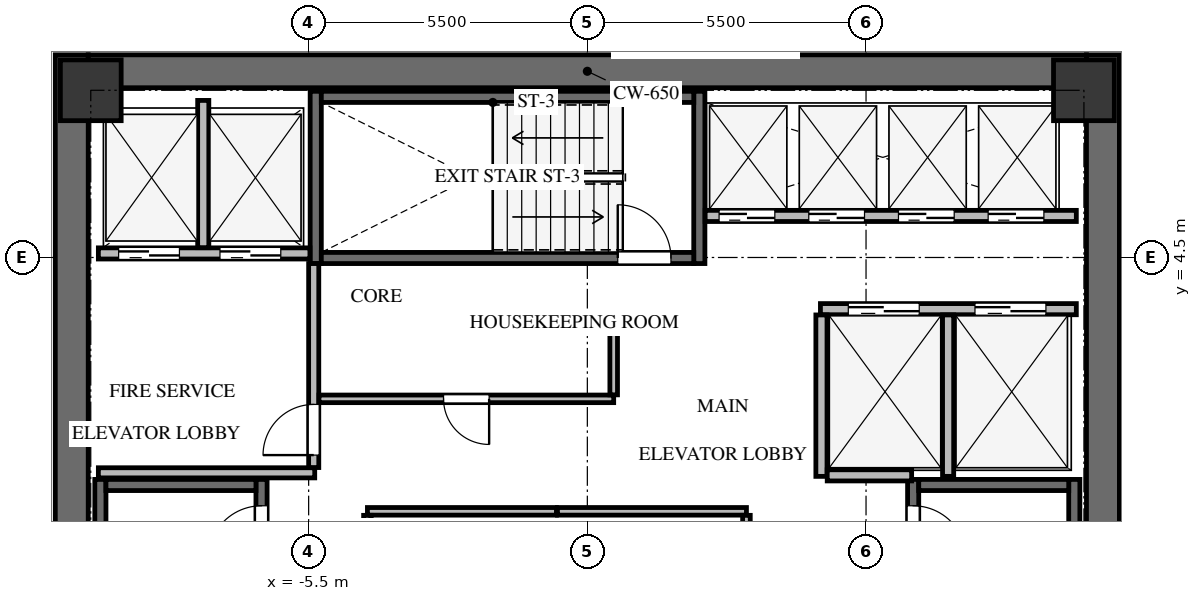
"""IFC4 building model, lengths in metres.
Left out: names, types, materials, properties, quantities, classifications, styles, units other than length and angle.
Written with IfcOpenShell. Run it as: python <this file> out.ifc"""

import sys

from ifc_helpers import new_model, si_unit, direction, frame, frame_2d, origin, origin_2d, place, context, subcontext, project, spatial, rectangle, extrude, source, transform, mapped, element, fill, save


model = new_model("IFC4")
c1 = context("Model", 3, precision=1e-05, world=origin(), true_north=direction((0.0, 1.0)))
c2 = subcontext(c1, "Body", "Model", "MODEL_VIEW")
j1 = project(units=[si_unit("LENGTHUNIT", "METRE"), si_unit("PLANEANGLEUNIT", "RADIAN")], contexts=[c1])
p1 = place(None, origin())
s1 = spatial("IfcSite", under=j1, at=p1, CompositionType="ELEMENT")
p2 = place(p1, origin())
s2 = spatial("IfcBuilding", under=s1, at=p2, CompositionType="ELEMENT")
p3 = place(p2, frame((0.0, 0.0, 183.7)))
s3 = spatial("IfcBuildingStorey", under=s2, at=p3, CompositionType="ELEMENT", Elevation=183.7)
for number, where, z_axis, x_axis in (
    (1, (-10.175, -8.5, 0.0), (0.0, 0.0, 1.0), (0.0, 1.0, 0.0)),
    (2, (10.175, -8.5, 0.0), (0.0, 0.0, 1.0), (0.0, 1.0, 0.0)),
):
    element("IfcWall", number, at=place(p3, frame(where, z_axis=z_axis, x_axis=x_axis)), inside=s3, PredefinedType="SHEAR", context=c2, shape_type="SweptSolid", body=[
        extrude(rectangle(XDim=17.0, YDim=0.65, at=frame_2d((8.5, 0.0))), origin(), (0.0, 0.0, 1.0), 3.3),
    ])
p4 = place(p3, frame((-9.85, 8.175, 0.0), z_axis=(0.0, 0.0, 1.0), x_axis=(1.0, 0.0, 0.0)))
e3 = element("IfcWall", 3, at=p4, inside=s3, PredefinedType="SHEAR", context=c2, shape_type="SweptSolid", body=[
    extrude(rectangle(XDim=19.7, YDim=0.65, at=frame_2d((9.85, 0.0))), origin(), (0.0, 0.0, 1.0), 3.3),
])
p5 = place(p3, frame((-6.43, -7.77, -0.24), z_axis=(0.0, 0.0, 1.0), x_axis=(0.0, 1.0, 0.0)))
e4 = element("IfcWall", 4, at=p5, inside=s3, PredefinedType="SHEAR", context=c2, shape_type="SweptSolid", body=[
    extrude(rectangle(XDim=7.89, YDim=0.22, at=frame_2d((3.945, 0.0))), origin(), (0.0, 0.0, 1.0), 3.3),
])
p6 = place(p5, frame((6.32, 0.0, 0.0)))
e5 = element("IfcOpeningElement", 5, at=p6, cuts=e4, PredefinedType="OPENING", context=c2, shape_type="SweptSolid", body=[
    extrude(rectangle(XDim=1.05, YDim=2.15, at=frame_2d((0.525, 1.075))), frame((0.0, 0.12, 0.0), z_axis=(0.0, -1.0, 0.0), x_axis=(1.0, 0.0, 0.0)), (0.0, 0.0, 1.0), 0.24),
])
p7 = place(p3, frame((-9.61, 0.12, -0.24), z_axis=(0.0, 0.0, 1.0), x_axis=(0.0, -1.0, 0.0)))
e6 = element("IfcWall", 6, at=p7, inside=s3, PredefinedType="SHEAR", context=c2, shape_type="SweptSolid", body=[
    extrude(rectangle(XDim=7.89, YDim=0.22, at=frame_2d((3.945, 0.0))), origin(), (0.0, 0.0, 1.0), 3.3),
])
p8 = place(p3, frame((-6.54, 0.01, -0.24), z_axis=(0.0, 0.0, 1.0), x_axis=(-1.0, 0.0, 0.0)))
e7 = element("IfcWall", 7, at=p8, inside=s3, PredefinedType="SHEAR", context=c2, shape_type="SweptSolid", body=[
    extrude(rectangle(XDim=2.96, YDim=0.22, at=frame_2d((1.48, 0.0))), origin(), (0.0, 0.0, 1.0), 3.3),
])
p9 = place(p3, frame((9.61, -7.77, -0.24), z_axis=(0.0, 0.0, 1.0), x_axis=(0.0, 1.0, 0.0)))
e8 = element("IfcWall", 8, at=p9, inside=s3, PredefinedType="SHEAR", context=c2, shape_type="SweptSolid", body=[
    extrude(rectangle(XDim=7.89, YDim=0.22, at=frame_2d((3.945, 0.0))), origin(), (0.0, 0.0, 1.0), 3.3),
])
p10 = place(p3, frame((6.43, 0.12, -0.24), z_axis=(0.0, 0.0, 1.0), x_axis=(0.0, -1.0, 0.0)))
e9 = element("IfcWall", 9, at=p10, inside=s3, PredefinedType="SHEAR", context=c2, shape_type="SweptSolid", body=[
    extrude(rectangle(XDim=7.89, YDim=0.22, at=frame_2d((3.945, 0.0))), origin(), (0.0, 0.0, 1.0), 3.3),
])
p11 = place(p10, frame((0.52, 0.0, 0.0)))
e10 = element("IfcOpeningElement", 10, at=p11, cuts=e9, PredefinedType="OPENING", context=c2, shape_type="SweptSolid", body=[
    extrude(rectangle(XDim=1.05, YDim=2.15, at=frame_2d((0.525, 1.075))), frame((0.0, 0.12, 0.0), z_axis=(0.0, -1.0, 0.0), x_axis=(1.0, 0.0, 0.0)), (0.0, 0.0, 1.0), 0.24),
])
p12 = place(p3, frame((9.5, 0.01, -0.24), z_axis=(0.0, 0.0, 1.0), x_axis=(-1.0, 0.0, 0.0)))
e11 = element("IfcWall", 11, at=p12, inside=s3, PredefinedType="SHEAR", context=c2, shape_type="SweptSolid", body=[
    extrude(rectangle(XDim=2.96, YDim=0.22, at=frame_2d((1.48, 0.0))), origin(), (0.0, 0.0, 1.0), 3.3),
])
for number, where, z_axis, x_axis in (
    (12, (2.21, 4.38, -0.24), (0.0, 0.0, 1.0), (0.0, 1.0, 0.0)),
    (13, (-5.36, 7.78, -0.24), (0.0, 0.0, 1.0), (0.0, -1.0, 0.0)),
):
    element("IfcWall", number, at=place(p3, frame(where, z_axis=z_axis, x_axis=x_axis)), inside=s3, PredefinedType="SHEAR", context=c2, shape_type="SweptSolid", body=[
        extrude(rectangle(XDim=3.4, YDim=0.22, at=frame_2d((1.7, 0.0))), origin(), (0.0, 0.0, 1.0), 3.3),
    ])
p13 = place(p3, frame((-5.25, 4.49, -0.24), z_axis=(0.0, 0.0, 1.0), x_axis=(1.0, 0.0, 0.0)))
e14 = element("IfcWall", 14, at=p13, inside=s3, PredefinedType="SHEAR", context=c2, shape_type="SweptSolid", body=[
    extrude(rectangle(XDim=7.35, YDim=0.22, at=frame_2d((3.675, 0.0))), origin(), (0.0, 0.0, 1.0), 3.3),
])
p14 = place(p13, frame((5.85, 0.0, 0.0)))
e15 = element("IfcOpeningElement", 15, at=p14, cuts=e14, PredefinedType="OPENING", context=c2, shape_type="SweptSolid", body=[
    extrude(rectangle(XDim=1.05, YDim=2.15, at=frame_2d((0.525, 1.075))), frame((0.0, 0.12, 0.0), z_axis=(0.0, -1.0, 0.0), x_axis=(1.0, 0.0, 0.0)), (0.0, 0.0, 1.0), 0.24),
])
p15 = place(p3, frame((2.1, 7.67, -0.24), z_axis=(0.0, 0.0, 1.0), x_axis=(-1.0, 0.0, 0.0)))
e16 = element("IfcWall", 16, at=p15, inside=s3, PredefinedType="SHEAR", context=c2, shape_type="SweptSolid", body=[
    extrude(rectangle(XDim=7.35, YDim=0.22, at=frame_2d((3.675, 0.0))), origin(), (0.0, 0.0, 1.0), 3.3),
])
m1 = source(origin(), c2, "Body", "SweptSolid", [
    extrude(rectangle(XDim=1.2, YDim=1.2, at=origin_2d()), origin(), (0.0, 0.0, 1.0), 3.3),
])
for number, where, z_axis, x_axis in (
    (17, (9.8, 7.8, -0.24), (0.0, 0.0, 1.0), (1.0, 0.0, 0.0)),
    (18, (-9.8, 7.8, -0.24), (0.0, 0.0, 1.0), (1.0, 0.0, 0.0)),
):
    element("IfcColumn", number, at=place(p3, frame(where, z_axis=z_axis, x_axis=x_axis)), inside=s3, PredefinedType="COLUMN", context=c2, shape_type="MappedRepresentation", body=[
        mapped(m1, transform((0.0, 0.0, 0.0), x_axis=(1.0, 0.0, 0.0), y_axis=(0.0, 1.0, 0.0), z_axis=(0.0, 0.0, 1.0), scale=1.0)),
    ])
p16 = place(p3, frame((-9.65, 4.58, 0.0), z_axis=(0.0, 0.0, 1.0), x_axis=(1.0, 0.0, 0.0)))
e19 = element("IfcWall", 19, at=p16, inside=s3, PredefinedType="SOLIDWALL", context=c2, shape_type="SweptSolid", body=[
    extrude(rectangle(XDim=4.175, YDim=0.22, at=frame_2d((2.087, 0.0))), origin(), (0.0, 0.0, 1.0), 3.045),
])
p17 = place(p16, frame((0.4, 0.0, 0.0)))
e20 = element("IfcOpeningElement", 20, at=p17, cuts=e19, PredefinedType="OPENING", context=c2, shape_type="SweptSolid", body=[
    extrude(rectangle(XDim=1.2, YDim=2.15, at=frame_2d((0.6, 1.075))), frame((0.0, 0.12, 0.0), z_axis=(0.0, -1.0, 0.0), x_axis=(1.0, 0.0, 0.0)), (0.0, 0.0, 1.0), 0.24),
])
p18 = place(p16, frame((2.4, 0.0, 0.0)))
e21 = element("IfcOpeningElement", 21, at=p18, cuts=e19, PredefinedType="OPENING", context=c2, shape_type="SweptSolid", body=[
    extrude(rectangle(XDim=1.2, YDim=2.15, at=frame_2d((0.6, 1.075))), frame((0.0, 0.12, 0.0), z_axis=(0.0, -1.0, 0.0), x_axis=(1.0, 0.0, 0.0)), (0.0, 0.0, 1.0), 0.24),
])
p19 = place(p3, frame((-7.58, 4.694, 0.0), z_axis=(0.0, 0.0, 1.0), x_axis=(0.0, 1.0, 0.0)))
e22 = element("IfcWall", 22, at=p19, inside=s3, PredefinedType="SOLIDWALL", context=c2, shape_type="SweptSolid", body=[
    extrude(rectangle(XDim=2.906, YDim=0.22, at=frame_2d((1.453, 0.0))), origin(), (0.0, 0.0, 1.0), 3.045),
])
p20 = place(p3, frame((-9.65, 0.25, 0.0), z_axis=(0.0, 0.0, 1.0), x_axis=(1.0, 0.0, 0.0)))
e23 = element("IfcWall", 23, at=p20, inside=s3, PredefinedType="SOLIDWALL", context=c2, shape_type="SweptSolid", body=[
    extrude(rectangle(XDim=4.27, YDim=0.2, at=frame_2d((2.135, 0.0))), origin(), (0.0, 0.0, 1.0), 3.045),
])
p21 = place(p3, frame((-5.4, 0.354, 0.0), z_axis=(0.0, 0.0, 1.0), x_axis=(0.0, 1.0, 0.0)))
e24 = element("IfcWall", 24, at=p21, inside=s3, PredefinedType="SOLIDWALL", context=c2, shape_type="SweptSolid", body=[
    extrude(rectangle(XDim=4.026, YDim=0.2, at=frame_2d((2.013, 0.0))), origin(), (0.0, 0.0, 1.0), 3.045),
])
p22 = place(p21, frame((0.246, 0.0, 0.0)))
e25 = element("IfcOpeningElement", 25, at=p22, cuts=e24, PredefinedType="OPENING", context=c2, shape_type="SweptSolid", body=[
    extrude(rectangle(XDim=1.0, YDim=2.15, at=frame_2d((0.5, 1.075))), frame((0.0, 0.11, 0.0), z_axis=(0.0, -1.0, 0.0), x_axis=(1.0, 0.0, 0.0)), (0.0, 0.0, 1.0), 0.22),
])
p23 = place(p3, frame((4.6, 3.48, 0.0), z_axis=(0.0, 0.0, 1.0), x_axis=(1.0, 0.0, 0.0)))
e26 = element("IfcWall", 26, at=p23, inside=s3, PredefinedType="SOLIDWALL", context=c2, shape_type="SweptSolid", body=[
    extrude(rectangle(XDim=5.05, YDim=0.22, at=frame_2d((2.525, 0.0))), origin(), (0.0, 0.0, 1.0), 3.045),
])
p24 = place(p23, frame((0.55, 0.0, 0.0)))
e27 = element("IfcOpeningElement", 27, at=p24, cuts=e26, PredefinedType="OPENING", context=c2, shape_type="SweptSolid", body=[
    extrude(rectangle(XDim=1.4, YDim=2.15, at=frame_2d((0.7, 1.075))), frame((0.0, 0.12, 0.0), z_axis=(0.0, -1.0, 0.0), x_axis=(1.0, 0.0, 0.0)), (0.0, 0.0, 1.0), 0.24),
])
p25 = place(p23, frame((3.05, 0.0, 0.0)))
e28 = element("IfcOpeningElement", 28, at=p25, cuts=e26, PredefinedType="OPENING", context=c2, shape_type="SweptSolid", body=[
    extrude(rectangle(XDim=1.4, YDim=2.15, at=frame_2d((0.7, 1.075))), frame((0.0, 0.12, 0.0), z_axis=(0.0, -1.0, 0.0), x_axis=(1.0, 0.0, 0.0)), (0.0, 0.0, 1.0), 0.24),
])
for number, where, z_axis, x_axis in (
    (29, (4.62, 0.18, 0.0), (0.0, 0.0, 1.0), (0.0, 1.0, 0.0)),
    (30, (7.12, 0.18, 0.0), (0.0, 0.0, 1.0), (0.0, 1.0, 0.0)),
):
    element("IfcWall", number, at=place(p3, frame(where, z_axis=z_axis, x_axis=x_axis)), inside=s3, PredefinedType="SOLIDWALL", context=c2, shape_type="SweptSolid", body=[
        extrude(rectangle(XDim=3.186, YDim=0.22, at=frame_2d((1.593, 0.0))), origin(), (0.0, 0.0, 1.0), 3.045),
    ])
p26 = place(p3, frame((4.734, 0.2, 0.0), z_axis=(0.0, 0.0, 1.0), x_axis=(1.0, 0.0, 0.0)))
e31 = element("IfcWall", 31, at=p26, inside=s3, PredefinedType="SOLIDWALL", context=c2, shape_type="SweptSolid", body=[
    extrude(rectangle(XDim=1.666, YDim=0.22, at=frame_2d((0.833, 0.0))), origin(), (0.0, 0.0, 1.0), 3.045),
])
p27 = place(p3, frame((2.325, 5.32, 0.0), z_axis=(0.0, 0.0, 1.0), x_axis=(1.0, 0.0, 0.0)))
e32 = element("IfcWall", 32, at=p27, inside=s3, PredefinedType="SOLIDWALL", context=c2, shape_type="SweptSolid", body=[
    extrude(rectangle(XDim=7.325, YDim=0.22, at=frame_2d((3.663, 0.0))), origin(), (0.0, 0.0, 1.0), 3.045),
])
p28 = place(p27, frame((0.275, 0.0, 0.0)))
e33 = element("IfcOpeningElement", 33, at=p28, cuts=e32, PredefinedType="OPENING", context=c2, shape_type="SweptSolid", body=[
    extrude(rectangle(XDim=1.1, YDim=2.15, at=frame_2d((0.55, 1.075))), frame((0.0, 0.12, 0.0), z_axis=(0.0, -1.0, 0.0), x_axis=(1.0, 0.0, 0.0)), (0.0, 0.0, 1.0), 0.24),
])
p29 = place(p27, frame((2.045, 0.0, 0.0)))
e34 = element("IfcOpeningElement", 34, at=p29, cuts=e32, PredefinedType="OPENING", context=c2, shape_type="SweptSolid", body=[
    extrude(rectangle(XDim=1.1, YDim=2.15, at=frame_2d((0.55, 1.075))), frame((0.0, 0.12, 0.0), z_axis=(0.0, -1.0, 0.0), x_axis=(1.0, 0.0, 0.0)), (0.0, 0.0, 1.0), 0.24),
])
p30 = place(p27, frame((3.815, 0.0, 0.0)))
e35 = element("IfcOpeningElement", 35, at=p30, cuts=e32, PredefinedType="OPENING", context=c2, shape_type="SweptSolid", body=[
    extrude(rectangle(XDim=1.1, YDim=2.15, at=frame_2d((0.55, 1.075))), frame((0.0, 0.12, 0.0), z_axis=(0.0, -1.0, 0.0), x_axis=(1.0, 0.0, 0.0)), (0.0, 0.0, 1.0), 0.24),
])
p31 = place(p27, frame((5.585, 0.0, 0.0)))
e36 = element("IfcOpeningElement", 36, at=p31, cuts=e32, PredefinedType="OPENING", context=c2, shape_type="SweptSolid", body=[
    extrude(rectangle(XDim=1.1, YDim=2.15, at=frame_2d((0.55, 1.075))), frame((0.0, 0.12, 0.0), z_axis=(0.0, -1.0, 0.0), x_axis=(1.0, 0.0, 0.0)), (0.0, 0.0, 1.0), 0.24),
])
p32 = place(p3, frame((-4.34, -0.51, 0.0), z_axis=(0.0, 0.0, 1.0), x_axis=(1.0, 0.0, 0.0)))
e37 = element("IfcWall", 37, at=p32, inside=s3, PredefinedType="PARTITIONING", context=c2, shape_type="SweptSolid", body=[
    extrude(rectangle(XDim=3.73, YDim=0.15, at=frame_2d((1.865, 0.0))), origin(), (0.0, 0.0, 1.0), 3.045),
])
p33 = place(p3, frame((-4.34, -2.961, 0.0), z_axis=(0.0, 0.0, 1.0), x_axis=(0.0, 1.0, 0.0)))
e38 = element("IfcWall", 38, at=p33, inside=s3, PredefinedType="PARTITIONING", context=c2, shape_type="SweptSolid", body=[
    extrude(rectangle(XDim=2.372, YDim=0.15, at=frame_2d((1.186, 0.0))), origin(), (0.0, 0.0, 1.0), 3.045),
])
p34 = place(p3, frame((-0.59, -0.51, 0.0), z_axis=(0.0, 0.0, 1.0), x_axis=(1.0, 0.0, 0.0)))
e39 = element("IfcWall", 39, at=p34, inside=s3, PredefinedType="PARTITIONING", context=c2, shape_type="SweptSolid", body=[
    extrude(rectangle(XDim=3.73, YDim=0.15, at=frame_2d((1.865, 0.0))), origin(), (0.0, 0.0, 1.0), 3.045),
])
p35 = place(p3, frame((3.14, -0.589, 0.0), z_axis=(0.0, 0.0, 1.0), x_axis=(0.0, -1.0, 0.0)))
e40 = element("IfcWall", 40, at=p35, inside=s3, PredefinedType="PARTITIONING", context=c2, shape_type="SweptSolid", body=[
    extrude(rectangle(XDim=2.372, YDim=0.15, at=frame_2d((1.186, 0.0))), origin(), (0.0, 0.0, 1.0), 3.045),
])
p36 = place(p3, frame((0.52, 1.71, 0.0), z_axis=(0.0, 0.0, 1.0), x_axis=(-1.0, 0.0, 0.0)))
e41 = element("IfcWall", 41, at=p36, inside=s3, PredefinedType="PARTITIONING", context=c2, shape_type="SweptSolid", body=[
    extrude(rectangle(XDim=5.816, YDim=0.15, at=frame_2d((2.908, 0.0))), origin(), (0.0, 0.0, 1.0), 3.045),
])
p37 = place(p36, frame((2.458, 0.0, 0.0)))
e42 = element("IfcOpeningElement", 42, at=p37, cuts=e41, PredefinedType="OPENING", context=c2, shape_type="SweptSolid", body=[
    extrude(rectangle(XDim=0.9, YDim=2.05, at=frame_2d((0.45, 1.025))), frame((0.0, 0.085, 0.0), z_axis=(0.0, -1.0, 0.0), x_axis=(1.0, 0.0, 0.0)), (0.0, 0.0, 1.0), 0.17),
])
p38 = place(p3, frame((0.52, 3.3, 0.0), z_axis=(0.0, 0.0, 1.0), x_axis=(0.0, -1.0, 0.0)))
e43 = element("IfcWall", 43, at=p38, inside=s3, PredefinedType="PARTITIONING", context=c2, shape_type="SweptSolid", body=[
    extrude(rectangle(XDim=1.511, YDim=0.15, at=frame_2d((0.755, 0.0))), origin(), (0.0, 0.0, 1.0), 3.045),
])
m2 = source(origin(), c2, "Body", "SweptSolid", [
    extrude(rectangle(XDim=1.05, YDim=2.15, at=frame_2d((0.525, 1.075))), frame((0.0, 0.025, 0.0), z_axis=(0.0, -1.0, 0.0), x_axis=(1.0, 0.0, 0.0)), (0.0, 0.0, 1.0), 0.05),
])
p39 = place(p6, origin())
e44 = element("IfcDoor", 44, at=p39, inside=s3, OperationType="SINGLE_SWING_LEFT", PredefinedType="DOOR", context=c2, shape_type="MappedRepresentation", body=[
    mapped(m2, transform((0.0, 0.0, 0.0), x_axis=(1.0, 0.0, 0.0), y_axis=(0.0, 1.0, 0.0), z_axis=(0.0, 0.0, 1.0), scale=1.0)),
])
fill(e5, e44)
m3 = source(origin(), c2, "Body", "SweptSolid", [
    extrude(rectangle(XDim=1.05, YDim=2.15, at=frame_2d((0.525, 1.075))), frame((0.0, 0.025, 0.0), z_axis=(0.0, -1.0, 0.0), x_axis=(1.0, 0.0, 0.0)), (0.0, 0.0, 1.0), 0.05),
])
p40 = place(p11, origin())
e45 = element("IfcDoor", 45, at=p40, inside=s3, OperationType="SINGLE_SWING_RIGHT", PredefinedType="DOOR", context=c2, shape_type="MappedRepresentation", body=[
    mapped(m3, transform((0.0, 0.0, 0.0), x_axis=(1.0, 0.0, 0.0), y_axis=(0.0, 1.0, 0.0), z_axis=(0.0, 0.0, 1.0), scale=1.0)),
])
fill(e10, e45)
p41 = place(p14, origin())
e46 = element("IfcDoor", 46, at=p41, inside=s3, OperationType="SINGLE_SWING_LEFT", PredefinedType="DOOR", context=c2, shape_type="MappedRepresentation", body=[
    mapped(m2, transform((0.0, 0.0, 0.0), x_axis=(1.0, 0.0, 0.0), y_axis=(0.0, 1.0, 0.0), z_axis=(0.0, 0.0, 1.0), scale=1.0)),
])
fill(e15, e46)
m4 = source(origin(), c2, "Body", "SweptSolid", [
    extrude(rectangle(XDim=1.2, YDim=2.15, at=frame_2d((0.6, 1.075))), frame((0.0, 0.025, 0.0), z_axis=(0.0, -1.0, 0.0), x_axis=(1.0, 0.0, 0.0)), (0.0, 0.0, 1.0), 0.05),
])
p42 = place(p17, origin())
e47 = element("IfcDoor", 47, at=p42, inside=s3, OperationType="DOUBLE_DOOR_SLIDING", PredefinedType="DOOR", context=c2, shape_type="MappedRepresentation", body=[
    mapped(m4, transform((0.0, 0.0, 0.0), x_axis=(1.0, 0.0, 0.0), y_axis=(0.0, 1.0, 0.0), z_axis=(0.0, 0.0, 1.0), scale=1.0)),
])
fill(e20, e47)
p43 = place(p18, origin())
e48 = element("IfcDoor", 48, at=p43, inside=s3, OperationType="DOUBLE_DOOR_SLIDING", PredefinedType="DOOR", context=c2, shape_type="MappedRepresentation", body=[
    mapped(m4, transform((0.0, 0.0, 0.0), x_axis=(1.0, 0.0, 0.0), y_axis=(0.0, 1.0, 0.0), z_axis=(0.0, 0.0, 1.0), scale=1.0)),
])
fill(e21, e48)
m5 = source(origin(), c2, "Body", "SweptSolid", [
    extrude(rectangle(XDim=1.0, YDim=2.15, at=frame_2d((0.5, 1.075))), frame((0.0, 0.025, 0.0), z_axis=(0.0, -1.0, 0.0), x_axis=(1.0, 0.0, 0.0)), (0.0, 0.0, 1.0), 0.05),
])
p44 = place(p22, origin())
e49 = element("IfcDoor", 49, at=p44, inside=s3, OperationType="SINGLE_SWING_LEFT", PredefinedType="DOOR", context=c2, shape_type="MappedRepresentation", body=[
    mapped(m5, transform((0.0, 0.0, 0.0), x_axis=(1.0, 0.0, 0.0), y_axis=(0.0, 1.0, 0.0), z_axis=(0.0, 0.0, 1.0), scale=1.0)),
])
fill(e25, e49)
m6 = source(origin(), c2, "Body", "SweptSolid", [
    extrude(rectangle(XDim=1.4, YDim=2.15, at=frame_2d((0.7, 1.075))), frame((0.0, 0.025, 0.0), z_axis=(0.0, -1.0, 0.0), x_axis=(1.0, 0.0, 0.0)), (0.0, 0.0, 1.0), 0.05),
])
p45 = place(p24, origin())
e50 = element("IfcDoor", 50, at=p45, inside=s3, OperationType="DOUBLE_DOOR_SLIDING", PredefinedType="DOOR", context=c2, shape_type="MappedRepresentation", body=[
    mapped(m6, transform((0.0, 0.0, 0.0), x_axis=(1.0, 0.0, 0.0), y_axis=(0.0, 1.0, 0.0), z_axis=(0.0, 0.0, 1.0), scale=1.0)),
])
fill(e27, e50)
p46 = place(p25, origin())
e51 = element("IfcDoor", 51, at=p46, inside=s3, OperationType="DOUBLE_DOOR_SLIDING", PredefinedType="DOOR", context=c2, shape_type="MappedRepresentation", body=[
    mapped(m6, transform((0.0, 0.0, 0.0), x_axis=(1.0, 0.0, 0.0), y_axis=(0.0, 1.0, 0.0), z_axis=(0.0, 0.0, 1.0), scale=1.0)),
])
fill(e28, e51)
m7 = source(origin(), c2, "Body", "SweptSolid", [
    extrude(rectangle(XDim=1.1, YDim=2.15, at=frame_2d((0.55, 1.075))), frame((0.0, 0.025, 0.0), z_axis=(0.0, -1.0, 0.0), x_axis=(1.0, 0.0, 0.0)), (0.0, 0.0, 1.0), 0.05),
])
p47 = place(p28, origin())
e52 = element("IfcDoor", 52, at=p47, inside=s3, OperationType="DOUBLE_DOOR_SLIDING", PredefinedType="DOOR", context=c2, shape_type="MappedRepresentation", body=[
    mapped(m7, transform((0.0, 0.0, 0.0), x_axis=(1.0, 0.0, 0.0), y_axis=(0.0, 1.0, 0.0), z_axis=(0.0, 0.0, 1.0), scale=1.0)),
])
fill(e33, e52)
p48 = place(p29, origin())
e53 = element("IfcDoor", 53, at=p48, inside=s3, OperationType="DOUBLE_DOOR_SLIDING", PredefinedType="DOOR", context=c2, shape_type="MappedRepresentation", body=[
    mapped(m7, transform((0.0, 0.0, 0.0), x_axis=(1.0, 0.0, 0.0), y_axis=(0.0, 1.0, 0.0), z_axis=(0.0, 0.0, 1.0), scale=1.0)),
])
fill(e34, e53)
p49 = place(p30, origin())
e54 = element("IfcDoor", 54, at=p49, inside=s3, OperationType="DOUBLE_DOOR_SLIDING", PredefinedType="DOOR", context=c2, shape_type="MappedRepresentation", body=[
    mapped(m7, transform((0.0, 0.0, 0.0), x_axis=(1.0, 0.0, 0.0), y_axis=(0.0, 1.0, 0.0), z_axis=(0.0, 0.0, 1.0), scale=1.0)),
])
fill(e35, e54)
p50 = place(p31, origin())
e55 = element("IfcDoor", 55, at=p50, inside=s3, OperationType="DOUBLE_DOOR_SLIDING", PredefinedType="DOOR", context=c2, shape_type="MappedRepresentation", body=[
    mapped(m7, transform((0.0, 0.0, 0.0), x_axis=(1.0, 0.0, 0.0), y_axis=(0.0, 1.0, 0.0), z_axis=(0.0, 0.0, 1.0), scale=1.0)),
])
fill(e36, e55)
m8 = source(origin(), c2, "Body", "SweptSolid", [
    extrude(rectangle(XDim=0.9, YDim=2.05, at=frame_2d((0.45, 1.025))), frame((0.0, 0.025, 0.0), z_axis=(0.0, -1.0, 0.0), x_axis=(1.0, 0.0, 0.0)), (0.0, 0.0, 1.0), 0.05),
])
p51 = place(p37, origin())
e56 = element("IfcDoor", 56, at=p51, inside=s3, OperationType="SINGLE_SWING_LEFT", PredefinedType="DOOR", context=c2, shape_type="MappedRepresentation", body=[
    mapped(m8, transform((0.0, 0.0, 0.0), x_axis=(1.0, 0.0, 0.0), y_axis=(0.0, 1.0, 0.0), z_axis=(0.0, 0.0, 1.0), scale=1.0)),
])
fill(e42, e56)
save(model, sys.argv[1])
